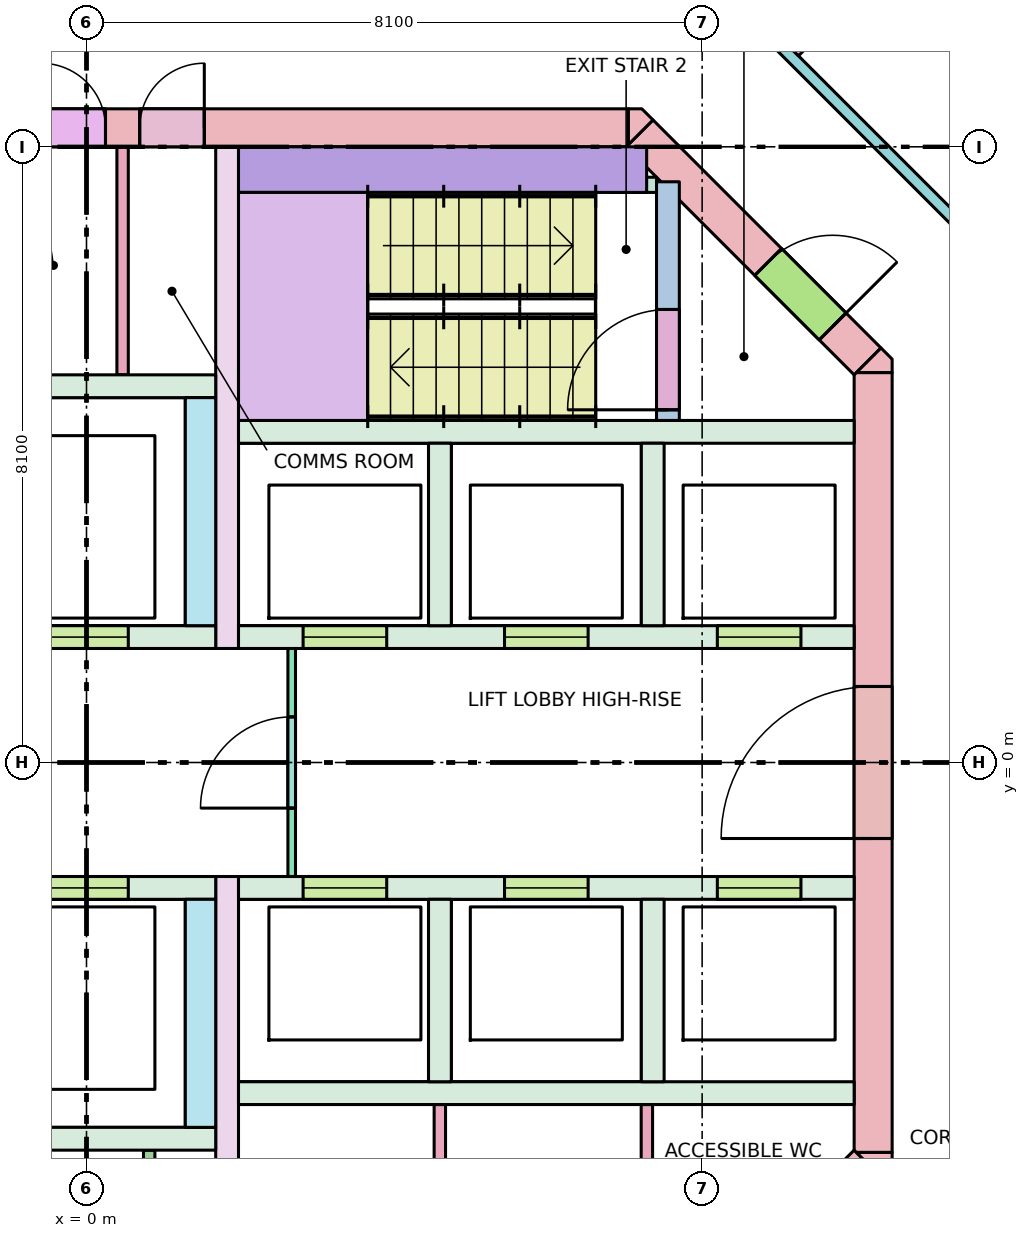
"""IFC4 building model, lengths in metres.
Left out: names, types, materials, properties, quantities, classifications, styles, units other than length and angle.
Written with IfcOpenShell. Run it as: python <this file> out.ifc"""

import sys

from ifc_helpers import new_model, si_unit, direction, frame, frame_2d, origin, place, context, subcontext, project, spatial, polyline, rectangle, outline, extrude, element, fill, save


model = new_model("IFC4")
c1 = context("Model", 3, precision=1e-05, world=origin(), true_north=direction((0.0, 1.0)))
c2 = subcontext(c1, "Body", "Model", "MODEL_VIEW")
j1 = project(units=[si_unit("LENGTHUNIT", "METRE"), si_unit("PLANEANGLEUNIT", "RADIAN")], contexts=[c1])
p1 = place(None, origin())
s1 = spatial("IfcSite", under=j1, at=p1, CompositionType="ELEMENT")
p2 = place(p1, origin())
s2 = spatial("IfcBuilding", under=s1, at=p2, CompositionType="ELEMENT")
p3 = place(p2, frame((0.0, 0.0, 253.8)))
s3 = spatial("IfcBuildingStorey", under=s2, at=p3, CompositionType="ELEMENT", Elevation=253.8)
p4 = place(p3, frame((-7.13, 8.35, -0.28), z_axis=(0.0, 0.0, 1.0), x_axis=(1.0, 0.0, 0.0)))
e1 = element("IfcWall", 1, at=p4, inside=s3, PredefinedType="SHEAR", context=c2, shape_type="SweptSolid", body=[
    extrude(rectangle(XDim=14.26, YDim=0.5, at=frame_2d((7.13, 0.0))), origin(), (0.0, 0.0, 1.0), 3.7),
])
p5 = place(p4, frame((5.48, 0.0, 0.28)))
e2 = element("IfcOpeningElement", 2, at=p5, cuts=e1, PredefinedType="OPENING", context=c2, shape_type="SweptSolid", body=[
    extrude(rectangle(XDim=0.7, YDim=2.1, at=frame_2d((0.35, 1.05))), frame((0.0, 0.26, 0.0), z_axis=(0.0, -1.0, 0.0), x_axis=(1.0, 0.0, 0.0)), (0.0, 0.0, 1.0), 0.52),
])
p6 = place(p4, frame((6.53, 0.0, 0.28)))
e3 = element("IfcOpeningElement", 3, at=p6, cuts=e1, PredefinedType="OPENING", context=c2, shape_type="SweptSolid", body=[
    extrude(rectangle(XDim=0.85, YDim=2.1, at=frame_2d((0.425, 1.05))), frame((0.0, 0.26, 0.0), z_axis=(0.0, -1.0, 0.0), x_axis=(1.0, 0.0, 0.0)), (0.0, 0.0, 1.0), 0.52),
])
p7 = place(p4, frame((7.83, 0.0, 0.28)))
e4 = element("IfcOpeningElement", 4, at=p7, cuts=e1, PredefinedType="OPENING", context=c2, shape_type="SweptSolid", body=[
    extrude(rectangle(XDim=0.85, YDim=2.1, at=frame_2d((0.425, 1.05))), frame((0.0, 0.26, 0.0), z_axis=(0.0, -1.0, 0.0), x_axis=(1.0, 0.0, 0.0)), (0.0, 0.0, 1.0), 0.52),
])
p8 = place(p3, frame((10.35, -5.13, -0.28), z_axis=(0.0, 0.0, 1.0), x_axis=(0.0, 1.0, 0.0)))
e5 = element("IfcWall", 5, at=p8, inside=s3, PredefinedType="SHEAR", context=c2, shape_type="SweptSolid", body=[
    extrude(rectangle(XDim=10.26, YDim=0.5, at=frame_2d((5.13, 0.0))), origin(), (0.0, 0.0, 1.0), 3.7),
])
p9 = place(p8, frame((4.13, 0.0, 0.28)))
e6 = element("IfcOpeningElement", 6, at=p9, cuts=e5, PredefinedType="OPENING", context=c2, shape_type="SweptSolid", body=[
    extrude(rectangle(XDim=2.0, YDim=2.1, at=frame_2d((1.0, 1.05))), frame((0.0, 0.26, 0.0), z_axis=(0.0, -1.0, 0.0), x_axis=(1.0, 0.0, 0.0)), (0.0, 0.0, 1.0), 0.52),
])
p10 = place(p3, frame((7.277, 8.277, -0.28), z_axis=(0.0, 0.0, 1.0), x_axis=(0.707106781187, -0.707106781187, 0.0)))
e7 = element("IfcWall", 7, at=p10, inside=s3, PredefinedType="SHEAR", context=c2, shape_type="SweptSolid", body=[
    extrude(rectangle(XDim=4.243, YDim=0.5, at=frame_2d((2.121, 0.0))), origin(), (0.0, 0.0, 1.0), 3.7),
])
p11 = place(p10, frame((2.393, 0.0, 0.28)))
e8 = element("IfcOpeningElement", 8, at=p11, cuts=e7, PredefinedType="OPENING", context=c2, shape_type="SweptSolid", body=[
    extrude(rectangle(XDim=1.2, YDim=2.1, at=frame_2d((0.6, 1.05))), frame((0.0, 0.26, 0.0), z_axis=(0.0, -1.0, 0.0), x_axis=(1.0, 0.0, 0.0)), (0.0, 0.0, 1.0), 0.52),
])
p12 = place(p3, frame((10.277, -5.277, -0.28), z_axis=(0.0, 0.0, 1.0), x_axis=(-0.707106781187, -0.707106781187, 0.0)))
e9 = element("IfcWall", 9, at=p12, inside=s3, PredefinedType="SHEAR", context=c2, shape_type="SweptSolid", body=[
    extrude(rectangle(XDim=4.243, YDim=0.5, at=frame_2d((2.121, 0.0))), origin(), (0.0, 0.0, 1.0), 3.7),
])
p13 = place(p12, frame((0.52, 0.0, 0.28)))
e10 = element("IfcOpeningElement", 10, at=p13, cuts=e9, PredefinedType="OPENING", context=c2, shape_type="SweptSolid", body=[
    extrude(rectangle(XDim=0.9, YDim=2.1, at=frame_2d((0.45, 1.05))), frame((0.0, 0.26, 0.0), z_axis=(0.0, -1.0, 0.0), x_axis=(1.0, 0.0, 0.0)), (0.0, 0.0, 1.0), 0.52),
])
p14 = place(p3, frame((0.0, 0.0, -0.28)))
e11 = element("IfcWall", 11, at=p14, inside=s3, PredefinedType="SHEAR", context=c2, shape_type="SweptSolid", body=[
    extrude(outline(polyline([(10.6, -5.307), (10.454, -5.454), (10.13, -5.13), (10.6, -5.13), (10.6, -5.307)])), origin(), (0.0, 0.0, 1.0), 3.7),
])
p15 = place(p3, frame((0.0, 0.0, -0.28)))
e12 = element("IfcWall", 12, at=p15, inside=s3, PredefinedType="SHEAR", context=c2, shape_type="SweptSolid", body=[
    extrude(outline(polyline([(10.6, 5.307), (10.6, 5.13), (10.13, 5.13), (10.454, 5.454), (10.6, 5.307)])), origin(), (0.0, 0.0, 1.0), 3.7),
])
p16 = place(p3, frame((0.0, 0.0, -0.28)))
e13 = element("IfcWall", 13, at=p16, inside=s3, PredefinedType="SHEAR", context=c2, shape_type="SweptSolid", body=[
    extrude(outline(polyline([(7.307, 8.6), (7.454, 8.454), (7.13, 8.13), (7.13, 8.6), (7.307, 8.6)])), origin(), (0.0, 0.0, 1.0), 3.7),
])
for number, where, z_axis, x_axis in (
    (14, (2.0, 4.35, 0.0), (0.0, 0.0, 1.0), (1.0, 0.0, 0.0)),
    (15, (2.0, -4.35, 0.0), (0.0, 0.0, 1.0), (1.0, 0.0, 0.0)),
):
    element("IfcWall", number, at=place(p3, frame(where, z_axis=z_axis, x_axis=x_axis)), inside=s3, PredefinedType="SOLIDWALL", context=c2, shape_type="SweptSolid", body=[
        extrude(rectangle(XDim=8.1, YDim=0.3, at=frame_2d((4.05, 0.0))), origin(), (0.0, 0.0, 1.0), 3.42),
    ])
p17 = place(p3, frame((2.0, 1.65, 0.0), z_axis=(0.0, 0.0, 1.0), x_axis=(1.0, 0.0, 0.0)))
e16 = element("IfcWall", 16, at=p17, inside=s3, PredefinedType="SOLIDWALL", context=c2, shape_type="SweptSolid", body=[
    extrude(rectangle(XDim=8.1, YDim=0.3, at=frame_2d((4.05, 0.0))), origin(), (0.0, 0.0, 1.0), 3.42),
])
p18 = place(p17, frame((0.85, 0.0, 0.0)))
e17 = element("IfcOpeningElement", 17, at=p18, cuts=e16, PredefinedType="OPENING", context=c2, shape_type="SweptSolid", body=[
    extrude(rectangle(XDim=1.1, YDim=2.1, at=frame_2d((0.55, 1.05))), frame((0.0, 0.16, 0.0), z_axis=(0.0, -1.0, 0.0), x_axis=(1.0, 0.0, 0.0)), (0.0, 0.0, 1.0), 0.32),
])
p19 = place(p17, frame((3.5, 0.0, 0.0)))
e18 = element("IfcOpeningElement", 18, at=p19, cuts=e16, PredefinedType="OPENING", context=c2, shape_type="SweptSolid", body=[
    extrude(rectangle(XDim=1.1, YDim=2.1, at=frame_2d((0.55, 1.05))), frame((0.0, 0.16, 0.0), z_axis=(0.0, -1.0, 0.0), x_axis=(1.0, 0.0, 0.0)), (0.0, 0.0, 1.0), 0.32),
])
p20 = place(p17, frame((6.3, 0.0, 0.0)))
e19 = element("IfcOpeningElement", 19, at=p20, cuts=e16, PredefinedType="OPENING", context=c2, shape_type="SweptSolid", body=[
    extrude(rectangle(XDim=1.1, YDim=2.1, at=frame_2d((0.55, 1.05))), frame((0.0, 0.16, 0.0), z_axis=(0.0, -1.0, 0.0), x_axis=(1.0, 0.0, 0.0)), (0.0, 0.0, 1.0), 0.32),
])
p21 = place(p3, frame((2.0, -1.65, 0.0), z_axis=(0.0, 0.0, 1.0), x_axis=(1.0, 0.0, 0.0)))
e20 = element("IfcWall", 20, at=p21, inside=s3, PredefinedType="SOLIDWALL", context=c2, shape_type="SweptSolid", body=[
    extrude(rectangle(XDim=8.1, YDim=0.3, at=frame_2d((4.05, 0.0))), origin(), (0.0, 0.0, 1.0), 3.42),
])
p22 = place(p21, frame((0.85, 0.0, 0.0)))
e21 = element("IfcOpeningElement", 21, at=p22, cuts=e20, PredefinedType="OPENING", context=c2, shape_type="SweptSolid", body=[
    extrude(rectangle(XDim=1.1, YDim=2.1, at=frame_2d((0.55, 1.05))), frame((0.0, 0.16, 0.0), z_axis=(0.0, -1.0, 0.0), x_axis=(1.0, 0.0, 0.0)), (0.0, 0.0, 1.0), 0.32),
])
p23 = place(p21, frame((3.5, 0.0, 0.0)))
e22 = element("IfcOpeningElement", 22, at=p23, cuts=e20, PredefinedType="OPENING", context=c2, shape_type="SweptSolid", body=[
    extrude(rectangle(XDim=1.1, YDim=2.1, at=frame_2d((0.55, 1.05))), frame((0.0, 0.16, 0.0), z_axis=(0.0, -1.0, 0.0), x_axis=(1.0, 0.0, 0.0)), (0.0, 0.0, 1.0), 0.32),
])
p24 = place(p21, frame((6.3, 0.0, 0.0)))
e23 = element("IfcOpeningElement", 23, at=p24, cuts=e20, PredefinedType="OPENING", context=c2, shape_type="SweptSolid", body=[
    extrude(rectangle(XDim=1.1, YDim=2.1, at=frame_2d((0.55, 1.05))), frame((0.0, 0.16, 0.0), z_axis=(0.0, -1.0, 0.0), x_axis=(1.0, 0.0, 0.0)), (0.0, 0.0, 1.0), 0.32),
])
for number, where, z_axis, x_axis in (
    (24, (4.65, 1.8, 0.0), (0.0, 0.0, 1.0), (0.0, 1.0, 0.0)),
    (25, (4.65, -4.2, 0.0), (0.0, 0.0, 1.0), (0.0, 1.0, 0.0)),
    (26, (7.45, 1.8, 0.0), (0.0, 0.0, 1.0), (0.0, 1.0, 0.0)),
    (27, (7.45, -4.2, 0.0), (0.0, 0.0, 1.0), (0.0, 1.0, 0.0)),
):
    element("IfcWall", number, at=place(p3, frame(where, z_axis=z_axis, x_axis=x_axis)), inside=s3, PredefinedType="SOLIDWALL", context=c2, shape_type="SweptSolid", body=[
        extrude(rectangle(XDim=2.4, YDim=0.3, at=frame_2d((1.2, 0.0))), origin(), (0.0, 0.0, 1.0), 3.42),
    ])
for number, where, z_axis, x_axis in (
    (28, (1.85, 1.5, 0.0), (0.0, 0.0, 1.0), (0.0, 1.0, 0.0)),
    (29, (1.85, -8.1, 0.0), (0.0, 0.0, 1.0), (0.0, 1.0, 0.0)),
):
    element("IfcWall", number, at=place(p3, frame(where, z_axis=z_axis, x_axis=x_axis)), inside=s3, PredefinedType="SHEAR", context=c2, shape_type="SweptSolid", body=[
        extrude(rectangle(XDim=6.6, YDim=0.3, at=frame_2d((3.3, 0.0))), origin(), (0.0, 0.0, 1.0), 3.42),
    ])
p25 = place(p3, frame((-1.7, 1.65, 0.0), z_axis=(0.0, 0.0, 1.0), x_axis=(1.0, 0.0, 0.0)))
e30 = element("IfcWall", 30, at=p25, inside=s3, PredefinedType="SOLIDWALL", context=c2, shape_type="SweptSolid", body=[
    extrude(rectangle(XDim=3.4, YDim=0.3, at=frame_2d((1.7, 0.0))), origin(), (0.0, 0.0, 1.0), 3.42),
])
p26 = place(p25, frame((1.15, 0.0, 0.0)))
e31 = element("IfcOpeningElement", 31, at=p26, cuts=e30, PredefinedType="OPENING", context=c2, shape_type="SweptSolid", body=[
    extrude(rectangle(XDim=1.1, YDim=2.1, at=frame_2d((0.55, 1.05))), frame((0.0, 0.16, 0.0), z_axis=(0.0, -1.0, 0.0), x_axis=(1.0, 0.0, 0.0)), (0.0, 0.0, 1.0), 0.32),
])
p27 = place(p3, frame((-1.7, -1.65, 0.0), z_axis=(0.0, 0.0, 1.0), x_axis=(1.0, 0.0, 0.0)))
e32 = element("IfcWall", 32, at=p27, inside=s3, PredefinedType="SOLIDWALL", context=c2, shape_type="SweptSolid", body=[
    extrude(rectangle(XDim=3.4, YDim=0.3, at=frame_2d((1.7, 0.0))), origin(), (0.0, 0.0, 1.0), 3.42),
])
p28 = place(p27, frame((1.15, 0.0, 0.0)))
e33 = element("IfcOpeningElement", 33, at=p28, cuts=e32, PredefinedType="OPENING", context=c2, shape_type="SweptSolid", body=[
    extrude(rectangle(XDim=1.1, YDim=2.1, at=frame_2d((0.55, 1.05))), frame((0.0, 0.16, 0.0), z_axis=(0.0, -1.0, 0.0), x_axis=(1.0, 0.0, 0.0)), (0.0, 0.0, 1.0), 0.32),
])
for number, where, z_axis, x_axis in (
    (34, (1.5, 1.8, 0.0), (0.0, 0.0, 1.0), (0.0, 1.0, 0.0)),
    (35, (1.5, -4.8, 0.0), (0.0, 0.0, 1.0), (0.0, 1.0, 0.0)),
):
    element("IfcWall", number, at=place(p3, frame(where, z_axis=z_axis, x_axis=x_axis)), inside=s3, PredefinedType="SOLIDWALL", context=c2, shape_type="SweptSolid", body=[
        extrude(rectangle(XDim=3.0, YDim=0.4, at=frame_2d((1.5, 0.0))), origin(), (0.0, 0.0, 1.0), 3.42),
    ])
for number, where, z_axis, x_axis in (
    (36, (-1.7, 4.95, 0.0), (0.0, 0.0, 1.0), (1.0, 0.0, 0.0)),
    (37, (-1.7, -4.95, 0.0), (0.0, 0.0, 1.0), (1.0, 0.0, 0.0)),
):
    element("IfcWall", number, at=place(p3, frame(where, z_axis=z_axis, x_axis=x_axis)), inside=s3, PredefinedType="SOLIDWALL", context=c2, shape_type="SweptSolid", body=[
        extrude(rectangle(XDim=3.4, YDim=0.3, at=frame_2d((1.7, 0.0))), origin(), (0.0, 0.0, 1.0), 3.42),
    ])
p29 = place(p3, frame((7.65, 4.5, 0.0), z_axis=(0.0, 0.0, 1.0), x_axis=(0.0, 1.0, 0.0)))
e38 = element("IfcWall", 38, at=p29, inside=s3, PredefinedType="SHEAR", context=c2, shape_type="SweptSolid", body=[
    extrude(rectangle(XDim=3.14, YDim=0.3, at=frame_2d((1.57, 0.0))), origin(), (0.0, 0.0, 1.0), 3.42),
])
p30 = place(p29, frame((0.14, 0.0, 0.0)))
e39 = element("IfcOpeningElement", 39, at=p30, cuts=e38, PredefinedType="OPENING", context=c2, shape_type="SweptSolid", body=[
    extrude(rectangle(XDim=1.32, YDim=2.1, at=frame_2d((0.66, 1.05))), frame((0.0, 0.16, 0.0), z_axis=(0.0, -1.0, 0.0), x_axis=(1.0, 0.0, 0.0)), (0.0, 0.0, 1.0), 0.32),
])
p31 = place(p3, frame((2.0, 7.8, 0.0), z_axis=(0.0, 0.0, 1.0), x_axis=(1.0, 0.0, 0.0)))
e40 = element("IfcWall", 40, at=p31, inside=s3, PredefinedType="SHEAR", context=c2, shape_type="SweptSolid", body=[
    extrude(rectangle(XDim=5.37, YDim=0.6, at=frame_2d((2.685, 0.0))), origin(), (0.0, 0.0, 1.0), 3.42),
])
p32 = place(p3, frame((6.9, 7.6, 0.0), z_axis=(0.0, 0.0, 1.0), x_axis=(1.0, 0.0, 0.0)))
e41 = element("IfcWall", 41, at=p32, inside=s3, PredefinedType="SHEAR", context=c2, shape_type="SweptSolid", body=[
    extrude(rectangle(XDim=0.6, YDim=0.2, at=frame_2d((0.3, 0.0))), origin(), (0.0, 0.0, 1.0), 3.42),
])
p33 = place(p3, frame((2.7, -1.5, 0.0), z_axis=(0.0, 0.0, 1.0), x_axis=(0.0, 1.0, 0.0)))
e42 = element("IfcWall", 42, at=p33, inside=s3, PredefinedType="PARTITIONING", context=c2, shape_type="SweptSolid", body=[
    extrude(rectangle(XDim=3.0, YDim=0.1, at=frame_2d((1.5, 0.0))), origin(), (0.0, 0.0, 1.0), 3.42),
])
p34 = place(p33, frame((0.9, 0.0, 0.0)))
e43 = element("IfcOpeningElement", 43, at=p34, cuts=e42, PredefinedType="OPENING", context=c2, shape_type="SweptSolid", body=[
    extrude(rectangle(XDim=1.2, YDim=2.1, at=frame_2d((0.6, 1.05))), frame((0.0, 0.06, 0.0), z_axis=(0.0, -1.0, 0.0), x_axis=(1.0, 0.0, 0.0)), (0.0, 0.0, 1.0), 0.12),
])
for number, where, z_axis, x_axis in (
    (44, (0.825, -8.1, 0.0), (0.0, 0.0, 1.0), (0.0, 1.0, 0.0)),
    (45, (0.475, 5.1, 0.0), (0.0, 0.0, 1.0), (0.0, 1.0, 0.0)),
):
    element("IfcWall", number, at=place(p3, frame(where, z_axis=z_axis, x_axis=x_axis)), inside=s3, PredefinedType="PARTITIONING", context=c2, shape_type="SweptSolid", body=[
        extrude(rectangle(XDim=3.0, YDim=0.15, at=frame_2d((1.5, 0.0))), origin(), (0.0, 0.0, 1.0), 3.42),
    ])
p35 = place(p3, frame((4.649, -8.1, 0.0), z_axis=(0.0, 0.0, 1.0), x_axis=(0.0, 1.0, 0.0)))
e46 = element("IfcWall", 46, at=p35, inside=s3, PredefinedType="PARTITIONING", context=c2, shape_type="SweptSolid", body=[
    extrude(rectangle(XDim=3.6, YDim=0.15, at=frame_2d((1.8, 0.0))), origin(), (0.0, 0.0, 1.0), 3.42),
])
p36 = place(p3, frame((7.373, -7.752, 0.0), z_axis=(0.0, 0.0, 1.0), x_axis=(0.0, 1.0, 0.0)))
e47 = element("IfcWall", 47, at=p36, inside=s3, PredefinedType="PARTITIONING", context=c2, shape_type="SweptSolid", body=[
    extrude(rectangle(XDim=3.252, YDim=0.15, at=frame_2d((1.626, 0.0))), origin(), (0.0, 0.0, 1.0), 3.42),
])
p37 = place(p3, frame((8.121, 10.438, 0.0), z_axis=(0.0, 0.0, 1.0), x_axis=(0.707106781187, -0.707106781187, 0.0)))
e48 = element("IfcWall", 48, at=p37, inside=s3, PredefinedType="PARTITIONING", context=c2, shape_type="SweptSolid", body=[
    extrude(rectangle(XDim=6.105, YDim=0.15, at=frame_2d((3.053, 0.0))), origin(), (0.0, 0.0, 1.0), 2.57),
])
p38 = place(p3, frame((9.333, 9.333, 0.0), z_axis=(0.0, 0.0, 1.0), x_axis=(0.707106781187, 0.707106781187, 0.0)))
e49 = element("IfcWall", 49, at=p38, inside=s3, PredefinedType="PARTITIONING", context=c2, shape_type="SweptSolid", body=[
    extrude(rectangle(XDim=7.639, YDim=0.1, at=frame_2d((3.819, 0.0))), origin(), (0.0, 0.0, 1.0), 2.57),
])
p39 = place(p18, origin())
e50 = element("IfcDoor", 50, at=p39, inside=s3, OperationType="DOUBLE_DOOR_SLIDING", PredefinedType="DOOR", context=c2, shape_type="SweptSolid", body=[
    extrude(rectangle(XDim=1.1, YDim=2.1, at=frame_2d((0.55, 1.05))), frame((0.0, 0.025, 0.0), z_axis=(0.0, -1.0, 0.0), x_axis=(1.0, 0.0, 0.0)), (0.0, 0.0, 1.0), 0.05),
])
fill(e17, e50)
p40 = place(p19, origin())
e51 = element("IfcDoor", 51, at=p40, inside=s3, OperationType="DOUBLE_DOOR_SLIDING", PredefinedType="DOOR", context=c2, shape_type="SweptSolid", body=[
    extrude(rectangle(XDim=1.1, YDim=2.1, at=frame_2d((0.55, 1.05))), frame((0.0, 0.025, 0.0), z_axis=(0.0, -1.0, 0.0), x_axis=(1.0, 0.0, 0.0)), (0.0, 0.0, 1.0), 0.05),
])
fill(e18, e51)
p41 = place(p20, origin())
e52 = element("IfcDoor", 52, at=p41, inside=s3, OperationType="DOUBLE_DOOR_SLIDING", PredefinedType="DOOR", context=c2, shape_type="SweptSolid", body=[
    extrude(rectangle(XDim=1.1, YDim=2.1, at=frame_2d((0.55, 1.05))), frame((0.0, 0.025, 0.0), z_axis=(0.0, -1.0, 0.0), x_axis=(1.0, 0.0, 0.0)), (0.0, 0.0, 1.0), 0.05),
])
fill(e19, e52)
p42 = place(p22, origin())
e53 = element("IfcDoor", 53, at=p42, inside=s3, OperationType="DOUBLE_DOOR_SLIDING", PredefinedType="DOOR", context=c2, shape_type="SweptSolid", body=[
    extrude(rectangle(XDim=1.1, YDim=2.1, at=frame_2d((0.55, 1.05))), frame((0.0, 0.025, 0.0), z_axis=(0.0, -1.0, 0.0), x_axis=(1.0, 0.0, 0.0)), (0.0, 0.0, 1.0), 0.05),
])
fill(e21, e53)
p43 = place(p23, origin())
e54 = element("IfcDoor", 54, at=p43, inside=s3, OperationType="DOUBLE_DOOR_SLIDING", PredefinedType="DOOR", context=c2, shape_type="SweptSolid", body=[
    extrude(rectangle(XDim=1.1, YDim=2.1, at=frame_2d((0.55, 1.05))), frame((0.0, 0.025, 0.0), z_axis=(0.0, -1.0, 0.0), x_axis=(1.0, 0.0, 0.0)), (0.0, 0.0, 1.0), 0.05),
])
fill(e22, e54)
p44 = place(p24, origin())
e55 = element("IfcDoor", 55, at=p44, inside=s3, OperationType="DOUBLE_DOOR_SLIDING", PredefinedType="DOOR", context=c2, shape_type="SweptSolid", body=[
    extrude(rectangle(XDim=1.1, YDim=2.1, at=frame_2d((0.55, 1.05))), frame((0.0, 0.025, 0.0), z_axis=(0.0, -1.0, 0.0), x_axis=(1.0, 0.0, 0.0)), (0.0, 0.0, 1.0), 0.05),
])
fill(e23, e55)
p45 = place(p26, origin())
e56 = element("IfcDoor", 56, at=p45, inside=s3, OperationType="DOUBLE_DOOR_SLIDING", PredefinedType="DOOR", context=c2, shape_type="SweptSolid", body=[
    extrude(rectangle(XDim=1.1, YDim=2.1, at=frame_2d((0.55, 1.05))), frame((0.0, 0.025, 0.0), z_axis=(0.0, -1.0, 0.0), x_axis=(1.0, 0.0, 0.0)), (0.0, 0.0, 1.0), 0.05),
])
fill(e31, e56)
p46 = place(p28, origin())
e57 = element("IfcDoor", 57, at=p46, inside=s3, OperationType="DOUBLE_DOOR_SLIDING", PredefinedType="DOOR", context=c2, shape_type="SweptSolid", body=[
    extrude(rectangle(XDim=1.1, YDim=2.1, at=frame_2d((0.55, 1.05))), frame((0.0, 0.025, 0.0), z_axis=(0.0, -1.0, 0.0), x_axis=(1.0, 0.0, 0.0)), (0.0, 0.0, 1.0), 0.05),
])
fill(e33, e57)
p47 = place(p30, origin())
e58 = element("IfcDoor", 58, at=p47, inside=s3, OperationType="DOUBLE_DOOR_SINGLE_SWING", PredefinedType="DOOR", context=c2, shape_type="SweptSolid", body=[
    extrude(rectangle(XDim=1.32, YDim=2.1, at=frame_2d((0.66, 1.05))), frame((0.0, 0.025, 0.0), z_axis=(0.0, -1.0, 0.0), x_axis=(1.0, 0.0, 0.0)), (0.0, 0.0, 1.0), 0.05),
])
fill(e39, e58)
p48 = place(p11, origin())
e59 = element("IfcDoor", 59, at=p48, inside=s3, OperationType="SINGLE_SWING_RIGHT", PredefinedType="DOOR", context=c2, shape_type="SweptSolid", body=[
    extrude(rectangle(XDim=1.2, YDim=2.1, at=frame_2d((0.6, 1.05))), frame((0.0, 0.025, 0.0), z_axis=(0.0, -1.0, 0.0), x_axis=(1.0, 0.0, 0.0)), (0.0, 0.0, 1.0), 0.05),
])
fill(e8, e59)
p49 = place(p9, origin())
e60 = element("IfcDoor", 60, at=p49, inside=s3, OperationType="DOUBLE_DOOR_SINGLE_SWING", PredefinedType="DOOR", context=c2, shape_type="SweptSolid", body=[
    extrude(rectangle(XDim=2.0, YDim=2.1, at=frame_2d((1.0, 1.05))), frame((0.0, 0.025, 0.0), z_axis=(0.0, -1.0, 0.0), x_axis=(1.0, 0.0, 0.0)), (0.0, 0.0, 1.0), 0.05),
])
fill(e6, e60)
p50 = place(p34, origin())
e61 = element("IfcDoor", 61, at=p50, inside=s3, OperationType="SINGLE_SWING_LEFT", PredefinedType="DOOR", context=c2, shape_type="SweptSolid", body=[
    extrude(rectangle(XDim=1.2, YDim=2.1, at=frame_2d((0.6, 1.05))), frame((0.0, 0.025, 0.0), z_axis=(0.0, -1.0, 0.0), x_axis=(1.0, 0.0, 0.0)), (0.0, 0.0, 1.0), 0.05),
])
fill(e43, e61)
p51 = place(p6, origin())
e62 = element("IfcDoor", 62, at=p51, inside=s3, OperationType="SINGLE_SWING_LEFT", PredefinedType="DOOR", context=c2, shape_type="SweptSolid", body=[
    extrude(rectangle(XDim=0.85, YDim=2.1, at=frame_2d((0.425, 1.05))), frame((0.0, 0.025, 0.0), z_axis=(0.0, -1.0, 0.0), x_axis=(1.0, 0.0, 0.0)), (0.0, 0.0, 1.0), 0.05),
])
fill(e3, e62)
p52 = place(p7, origin())
e63 = element("IfcDoor", 63, at=p52, inside=s3, OperationType="SINGLE_SWING_RIGHT", PredefinedType="DOOR", context=c2, shape_type="SweptSolid", body=[
    extrude(rectangle(XDim=0.85, YDim=2.1, at=frame_2d((0.425, 1.05))), frame((0.0, 0.025, 0.0), z_axis=(0.0, -1.0, 0.0), x_axis=(1.0, 0.0, 0.0)), (0.0, 0.0, 1.0), 0.05),
])
fill(e4, e63)
save(model, sys.argv[1])
